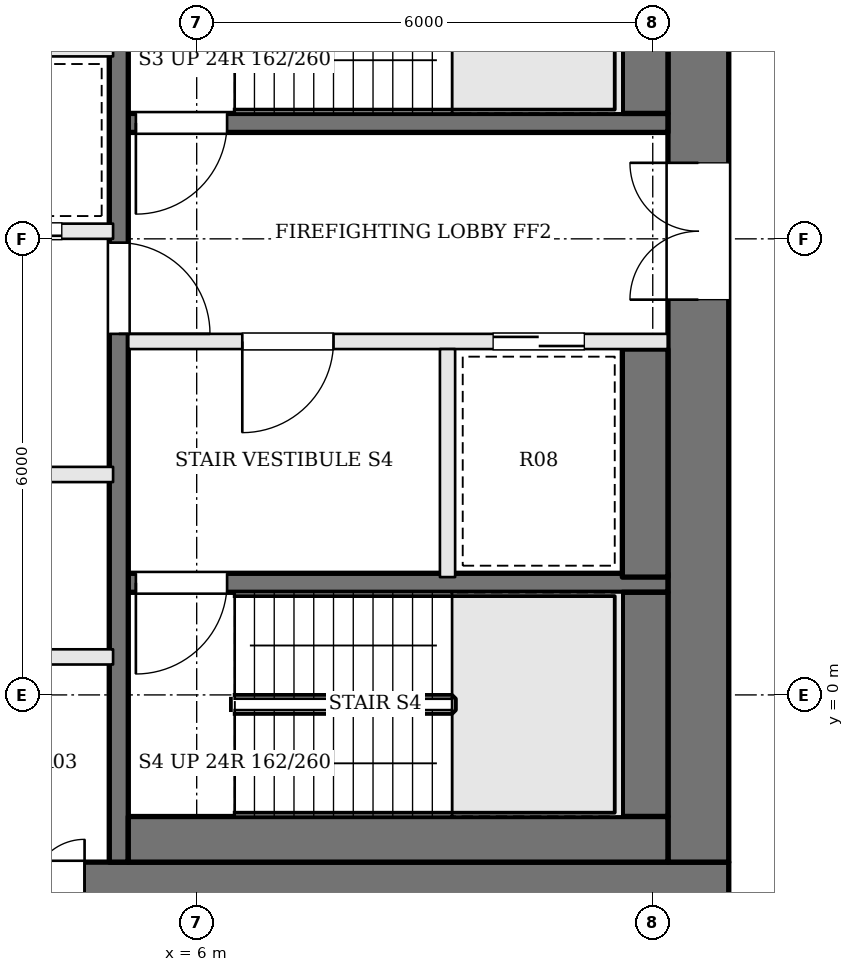
"""IFC4 building model, lengths in metres.
Left out: names, types, materials, properties, quantities, classifications, styles, units other than length and angle.
Written with IfcOpenShell. Run it as: python <this file> out.ifc"""

import sys

from ifc_helpers import new_model, si_unit, direction, frame, frame_2d, origin, place, context, subcontext, project, spatial, rectangle, extrude, element, fill, save


model = new_model("IFC4")
c1 = context("Model", 3, precision=1e-05, world=origin(), true_north=direction((0.0, 1.0)))
c2 = subcontext(c1, "Body", "Model", "MODEL_VIEW")
j1 = project(units=[si_unit("LENGTHUNIT", "METRE"), si_unit("PLANEANGLEUNIT", "RADIAN")], contexts=[c1])
p1 = place(None, origin())
s1 = spatial("IfcSite", under=j1, at=p1, CompositionType="ELEMENT")
p2 = place(p1, origin())
s2 = spatial("IfcBuilding", under=s1, at=p2, CompositionType="ELEMENT")
p3 = place(p2, frame((0.0, 0.0, 272.7)))
s3 = spatial("IfcBuildingStorey", under=s2, at=p3, CompositionType="ELEMENT", Elevation=272.7)
p4 = place(p3, frame((-13.0, -2.6, 0.0), z_axis=(0.0, 0.0, 1.0), x_axis=(1.0, 0.0, 0.0)))
e1 = element("IfcWall", 1, at=p4, inside=s3, PredefinedType="SHEAR", context=c2, shape_type="SweptSolid", body=[
    extrude(rectangle(XDim=26.0, YDim=0.8, at=frame_2d((13.0, 0.0))), origin(), (0.0, 0.0, 1.0), 3.9),
])
p5 = place(p4, frame((9.475, 0.0, 0.0)))
e2 = element("IfcOpeningElement", 2, at=p5, cuts=e1, PredefinedType="OPENING", context=c2, shape_type="SweptSolid", body=[
    extrude(rectangle(XDim=0.9, YDim=2.1, at=frame_2d((0.45, 1.05))), frame((0.0, 0.41, 0.0), z_axis=(0.0, -1.0, 0.0), x_axis=(1.0, 0.0, 0.0)), (0.0, 0.0, 1.0), 0.82),
])
p6 = place(p4, frame((12.75, 0.0, 0.0)))
e3 = element("IfcOpeningElement", 3, at=p6, cuts=e1, PredefinedType="OPENING", context=c2, shape_type="SweptSolid", body=[
    extrude(rectangle(XDim=0.9, YDim=2.1, at=frame_2d((0.45, 1.05))), frame((0.0, 0.41, 0.0), z_axis=(0.0, -1.0, 0.0), x_axis=(1.0, 0.0, 0.0)), (0.0, 0.0, 1.0), 0.82),
])
p7 = place(p4, frame((15.05, 0.0, 0.0)))
e4 = element("IfcOpeningElement", 4, at=p7, cuts=e1, PredefinedType="OPENING", context=c2, shape_type="SweptSolid", body=[
    extrude(rectangle(XDim=1.0, YDim=2.1, at=frame_2d((0.5, 1.05))), frame((0.0, 0.41, 0.0), z_axis=(0.0, -1.0, 0.0), x_axis=(1.0, 0.0, 0.0)), (0.0, 0.0, 1.0), 0.82),
])
p8 = place(p4, frame((16.825, 0.0, 0.0)))
e5 = element("IfcOpeningElement", 5, at=p8, cuts=e1, PredefinedType="OPENING", context=c2, shape_type="SweptSolid", body=[
    extrude(rectangle(XDim=0.7, YDim=2.1, at=frame_2d((0.35, 1.05))), frame((0.0, 0.41, 0.0), z_axis=(0.0, -1.0, 0.0), x_axis=(1.0, 0.0, 0.0)), (0.0, 0.0, 1.0), 0.82),
])
p9 = place(p3, frame((12.6, -2.2, 0.0), z_axis=(0.0, 0.0, 1.0), x_axis=(0.0, 1.0, 0.0)))
e6 = element("IfcWall", 6, at=p9, inside=s3, PredefinedType="SHEAR", context=c2, shape_type="SweptSolid", body=[
    extrude(rectangle(XDim=13.4, YDim=0.8, at=frame_2d((6.7, 0.0))), origin(), (0.0, 0.0, 1.0), 3.9),
])
p10 = place(p9, frame((7.4, 0.0, 0.0)))
e7 = element("IfcOpeningElement", 7, at=p10, cuts=e6, PredefinedType="OPENING", context=c2, shape_type="SweptSolid", body=[
    extrude(rectangle(XDim=1.8, YDim=2.1, at=frame_2d((0.9, 1.05))), frame((0.0, 0.41, 0.0), z_axis=(0.0, -1.0, 0.0), x_axis=(1.0, 0.0, 0.0)), (0.0, 0.0, 1.0), 0.82),
])
p11 = place(p3, frame((12.2, 7.525, 0.0), z_axis=(0.0, 0.0, 1.0), x_axis=(-1.0, 0.0, 0.0)))
e8 = element("IfcWall", 8, at=p11, inside=s3, PredefinedType="SOLIDWALL", context=c2, shape_type="SweptSolid", body=[
    extrude(rectangle(XDim=7.1, YDim=0.25, at=frame_2d((3.55, 0.0))), origin(), (0.0, 0.0, 1.0), 3.7),
])
p12 = place(p11, frame((5.8, 0.0, 0.0)))
e9 = element("IfcOpeningElement", 9, at=p12, cuts=e8, PredefinedType="OPENING", context=c2, shape_type="SweptSolid", body=[
    extrude(rectangle(XDim=1.2, YDim=2.1, at=frame_2d((0.6, 1.05))), frame((0.0, 0.135, 0.0), z_axis=(0.0, -1.0, 0.0), x_axis=(1.0, 0.0, 0.0)), (0.0, 0.0, 1.0), 0.27),
])
p13 = place(p3, frame((12.2, 4.65, 0.0), z_axis=(0.0, 0.0, 1.0), x_axis=(-1.0, 0.0, 0.0)))
e10 = element("IfcWall", 10, at=p13, inside=s3, PredefinedType="SOLIDWALL", context=c2, shape_type="SweptSolid", body=[
    extrude(rectangle(XDim=7.1, YDim=0.2, at=frame_2d((3.55, 0.0))), origin(), (0.0, 0.0, 1.0), 3.7),
])
p14 = place(p13, frame((4.4, 0.0, 0.0)))
e11 = element("IfcOpeningElement", 11, at=p14, cuts=e10, PredefinedType="OPENING", context=c2, shape_type="SweptSolid", body=[
    extrude(rectangle(XDim=1.2, YDim=2.1, at=frame_2d((0.6, 1.05))), frame((0.0, 0.11, 0.0), z_axis=(0.0, -1.0, 0.0), x_axis=(1.0, 0.0, 0.0)), (0.0, 0.0, 1.0), 0.22),
])
p15 = place(p13, frame((1.1, 0.0, 0.0)))
e12 = element("IfcOpeningElement", 12, at=p15, cuts=e10, PredefinedType="OPENING", context=c2, shape_type="SweptSolid", body=[
    extrude(rectangle(XDim=1.2, YDim=2.1, at=frame_2d((0.6, 1.05))), frame((0.0, 0.11, 0.0), z_axis=(0.0, -1.0, 0.0), x_axis=(1.0, 0.0, 0.0)), (0.0, 0.0, 1.0), 0.22),
])
p16 = place(p3, frame((12.2, 1.475, 0.0), z_axis=(0.0, 0.0, 1.0), x_axis=(-1.0, 0.0, 0.0)))
e13 = element("IfcWall", 13, at=p16, inside=s3, PredefinedType="SOLIDWALL", context=c2, shape_type="SweptSolid", body=[
    extrude(rectangle(XDim=7.1, YDim=0.25, at=frame_2d((3.55, 0.0))), origin(), (0.0, 0.0, 1.0), 3.7),
])
p17 = place(p16, frame((5.8, 0.0, 0.0)))
e14 = element("IfcOpeningElement", 14, at=p17, cuts=e13, PredefinedType="OPENING", context=c2, shape_type="SweptSolid", body=[
    extrude(rectangle(XDim=1.2, YDim=2.1, at=frame_2d((0.6, 1.05))), frame((0.0, 0.135, 0.0), z_axis=(0.0, -1.0, 0.0), x_axis=(1.0, 0.0, 0.0)), (0.0, 0.0, 1.0), 0.27),
])
p18 = place(p3, frame((9.3, 4.55, 0.0), z_axis=(0.0, 0.0, 1.0), x_axis=(0.0, -1.0, 0.0)))
e15 = element("IfcWall", 15, at=p18, inside=s3, PredefinedType="SOLIDWALL", context=c2, shape_type="SweptSolid", body=[
    extrude(rectangle(XDim=3.0, YDim=0.2, at=frame_2d((1.5, 0.0))), origin(), (0.0, 0.0, 1.0), 3.7),
])
p19 = place(p3, frame((4.975, 11.2, 0.0), z_axis=(0.0, 0.0, 1.0), x_axis=(0.0, -1.0, 0.0)))
e16 = element("IfcWall", 16, at=p19, inside=s3, PredefinedType="SOLIDWALL", context=c2, shape_type="SweptSolid", body=[
    extrude(rectangle(XDim=13.4, YDim=0.25, at=frame_2d((6.7, 0.0))), origin(), (0.0, 0.0, 1.0), 3.7),
])
p20 = place(p19, frame((5.25, 0.0, 0.0)))
e17 = element("IfcOpeningElement", 17, at=p20, cuts=e16, PredefinedType="OPENING", context=c2, shape_type="SweptSolid", body=[
    extrude(rectangle(XDim=1.2, YDim=2.1, at=frame_2d((0.6, 1.05))), frame((0.0, 0.135, 0.0), z_axis=(0.0, -1.0, 0.0), x_axis=(1.0, 0.0, 0.0)), (0.0, 0.0, 1.0), 0.27),
])
p21 = place(p3, frame((11.9, 10.6, 0.0), z_axis=(0.0, 0.0, 1.0), x_axis=(0.0, -1.0, 0.0)))
e18 = element("IfcWall", 18, at=p21, inside=s3, PredefinedType="SOLIDWALL", context=c2, shape_type="SweptSolid", body=[
    extrude(rectangle(XDim=2.95, YDim=0.6, at=frame_2d((1.475, 0.0))), origin(), (0.0, 0.0, 1.0), 3.7),
])
p22 = place(p3, frame((11.9, 4.55, 0.0), z_axis=(0.0, 0.0, 1.0), x_axis=(0.0, -1.0, 0.0)))
e19 = element("IfcWall", 19, at=p22, inside=s3, PredefinedType="SOLIDWALL", context=c2, shape_type="SweptSolid", body=[
    extrude(rectangle(XDim=3.0, YDim=0.6, at=frame_2d((1.5, 0.0))), origin(), (0.0, 0.0, 1.0), 3.7),
])
p23 = place(p3, frame((11.9, 1.35, 0.0), z_axis=(0.0, 0.0, 1.0), x_axis=(0.0, -1.0, 0.0)))
e20 = element("IfcWall", 20, at=p23, inside=s3, PredefinedType="SOLIDWALL", context=c2, shape_type="SweptSolid", body=[
    extrude(rectangle(XDim=2.95, YDim=0.6, at=frame_2d((1.475, 0.0))), origin(), (0.0, 0.0, 1.0), 3.7),
])
p24 = place(p3, frame((12.2, -1.9, 0.0), z_axis=(0.0, 0.0, 1.0), x_axis=(-1.0, 0.0, 0.0)))
e21 = element("IfcWall", 21, at=p24, inside=s3, PredefinedType="SOLIDWALL", context=c2, shape_type="SweptSolid", body=[
    extrude(rectangle(XDim=7.1, YDim=0.6, at=frame_2d((3.55, 0.0))), origin(), (0.0, 0.0, 1.0), 3.7),
])
p25 = place(p3, frame((-4.9, 0.5, 0.0), z_axis=(0.0, 0.0, 1.0), x_axis=(1.0, 0.0, 0.0)))
e22 = element("IfcWall", 22, at=p25, inside=s3, PredefinedType="SOLIDWALL", context=c2, shape_type="SweptSolid", body=[
    extrude(rectangle(XDim=9.8, YDim=0.2, at=frame_2d((4.9, 0.0))), origin(), (0.0, 0.0, 1.0), 3.7),
])
p26 = place(p3, frame((-4.9, 2.9, 0.0), z_axis=(0.0, 0.0, 1.0), x_axis=(1.0, 0.0, 0.0)))
e23 = element("IfcWall", 23, at=p26, inside=s3, PredefinedType="SOLIDWALL", context=c2, shape_type="SweptSolid", body=[
    extrude(rectangle(XDim=9.8, YDim=0.2, at=frame_2d((4.9, 0.0))), origin(), (0.0, 0.0, 1.0), 3.7),
])
p27 = place(p26, frame((0.675, 0.0, 0.0)))
e24 = element("IfcOpeningElement", 24, at=p27, cuts=e23, PredefinedType="OPENING", context=c2, shape_type="SweptSolid", body=[
    extrude(rectangle(XDim=1.1, YDim=2.1, at=frame_2d((0.55, 1.05))), frame((0.0, 0.11, 0.0), z_axis=(0.0, -1.0, 0.0), x_axis=(1.0, 0.0, 0.0)), (0.0, 0.0, 1.0), 0.22),
])
p28 = place(p26, frame((2.613, 0.0, 0.0)))
e25 = element("IfcOpeningElement", 25, at=p28, cuts=e23, PredefinedType="OPENING", context=c2, shape_type="SweptSolid", body=[
    extrude(rectangle(XDim=0.9, YDim=2.1, at=frame_2d((0.45, 1.05))), frame((0.0, 0.11, 0.0), z_axis=(0.0, -1.0, 0.0), x_axis=(1.0, 0.0, 0.0)), (0.0, 0.0, 1.0), 0.22),
])
p29 = place(p26, frame((4.35, 0.0, 0.0)))
e26 = element("IfcOpeningElement", 26, at=p29, cuts=e23, PredefinedType="OPENING", context=c2, shape_type="SweptSolid", body=[
    extrude(rectangle(XDim=1.1, YDim=2.1, at=frame_2d((0.55, 1.05))), frame((0.0, 0.11, 0.0), z_axis=(0.0, -1.0, 0.0), x_axis=(1.0, 0.0, 0.0)), (0.0, 0.0, 1.0), 0.22),
])
p30 = place(p26, frame((7.463, 0.0, 0.0)))
e27 = element("IfcOpeningElement", 27, at=p30, cuts=e23, PredefinedType="OPENING", context=c2, shape_type="SweptSolid", body=[
    extrude(rectangle(XDim=1.0, YDim=2.1, at=frame_2d((0.5, 1.05))), frame((0.0, 0.11, 0.0), z_axis=(0.0, -1.0, 0.0), x_axis=(1.0, 0.0, 0.0)), (0.0, 0.0, 1.0), 0.22),
])
p31 = place(p3, frame((-4.9, 6.1, 0.0), z_axis=(0.0, 0.0, 1.0), x_axis=(1.0, 0.0, 0.0)))
e28 = element("IfcWall", 28, at=p31, inside=s3, PredefinedType="SOLIDWALL", context=c2, shape_type="SweptSolid", body=[
    extrude(rectangle(XDim=9.8, YDim=0.2, at=frame_2d((4.9, 0.0))), origin(), (0.0, 0.0, 1.0), 3.7),
])
p32 = place(p31, frame((0.675, 0.0, 0.0)))
e29 = element("IfcOpeningElement", 29, at=p32, cuts=e28, PredefinedType="OPENING", context=c2, shape_type="SweptSolid", body=[
    extrude(rectangle(XDim=1.1, YDim=2.1, at=frame_2d((0.55, 1.05))), frame((0.0, 0.11, 0.0), z_axis=(0.0, -1.0, 0.0), x_axis=(1.0, 0.0, 0.0)), (0.0, 0.0, 1.0), 0.22),
])
p33 = place(p31, frame((3.125, 0.0, 0.0)))
e30 = element("IfcOpeningElement", 30, at=p33, cuts=e28, PredefinedType="OPENING", context=c2, shape_type="SweptSolid", body=[
    extrude(rectangle(XDim=1.1, YDim=2.1, at=frame_2d((0.55, 1.05))), frame((0.0, 0.11, 0.0), z_axis=(0.0, -1.0, 0.0), x_axis=(1.0, 0.0, 0.0)), (0.0, 0.0, 1.0), 0.22),
])
p34 = place(p31, frame((5.575, 0.0, 0.0)))
e31 = element("IfcOpeningElement", 31, at=p34, cuts=e28, PredefinedType="OPENING", context=c2, shape_type="SweptSolid", body=[
    extrude(rectangle(XDim=1.1, YDim=2.1, at=frame_2d((0.55, 1.05))), frame((0.0, 0.11, 0.0), z_axis=(0.0, -1.0, 0.0), x_axis=(1.0, 0.0, 0.0)), (0.0, 0.0, 1.0), 0.22),
])
p35 = place(p31, frame((8.025, 0.0, 0.0)))
e32 = element("IfcOpeningElement", 32, at=p35, cuts=e28, PredefinedType="OPENING", context=c2, shape_type="SweptSolid", body=[
    extrude(rectangle(XDim=1.1, YDim=2.1, at=frame_2d((0.55, 1.05))), frame((0.0, 0.11, 0.0), z_axis=(0.0, -1.0, 0.0), x_axis=(1.0, 0.0, 0.0)), (0.0, 0.0, 1.0), 0.22),
])
p36 = place(p3, frame((-4.9, 8.5, 0.0), z_axis=(0.0, 0.0, 1.0), x_axis=(1.0, 0.0, 0.0)))
e33 = element("IfcWall", 33, at=p36, inside=s3, PredefinedType="SOLIDWALL", context=c2, shape_type="SweptSolid", body=[
    extrude(rectangle(XDim=9.8, YDim=0.2, at=frame_2d((4.9, 0.0))), origin(), (0.0, 0.0, 1.0), 3.7),
])
p37 = place(p10, origin())
e34 = element("IfcDoor", 34, at=p37, inside=s3, OperationType="DOUBLE_DOOR_SINGLE_SWING", PredefinedType="DOOR", context=c2, shape_type="SweptSolid", body=[
    extrude(rectangle(XDim=1.8, YDim=2.1, at=frame_2d((0.9, 1.05))), frame((0.0, 0.025, 0.0), z_axis=(0.0, -1.0, 0.0), x_axis=(1.0, 0.0, 0.0)), (0.0, 0.0, 1.0), 0.05),
])
fill(e7, e34)
p38 = place(p20, origin())
e35 = element("IfcDoor", 35, at=p38, inside=s3, OperationType="SINGLE_SWING_RIGHT", PredefinedType="DOOR", context=c2, shape_type="SweptSolid", body=[
    extrude(rectangle(XDim=1.2, YDim=2.1, at=frame_2d((0.6, 1.05))), frame((0.0, 0.025, 0.0), z_axis=(0.0, -1.0, 0.0), x_axis=(1.0, 0.0, 0.0)), (0.0, 0.0, 1.0), 0.05),
])
fill(e17, e35)
p39 = place(p14, origin())
e36 = element("IfcDoor", 36, at=p39, inside=s3, OperationType="SINGLE_SWING_RIGHT", PredefinedType="DOOR", context=c2, shape_type="SweptSolid", body=[
    extrude(rectangle(XDim=1.2, YDim=2.1, at=frame_2d((0.6, 1.05))), frame((0.0, 0.025, 0.0), z_axis=(0.0, -1.0, 0.0), x_axis=(1.0, 0.0, 0.0)), (0.0, 0.0, 1.0), 0.05),
])
fill(e11, e36)
p40 = place(p12, origin())
e37 = element("IfcDoor", 37, at=p40, inside=s3, OperationType="SINGLE_SWING_RIGHT", PredefinedType="DOOR", context=c2, shape_type="SweptSolid", body=[
    extrude(rectangle(XDim=1.2, YDim=2.1, at=frame_2d((0.6, 1.05))), frame((0.0, 0.025, 0.0), z_axis=(0.0, -1.0, 0.0), x_axis=(1.0, 0.0, 0.0)), (0.0, 0.0, 1.0), 0.05),
])
fill(e9, e37)
p41 = place(p17, origin())
e38 = element("IfcDoor", 38, at=p41, inside=s3, OperationType="SINGLE_SWING_RIGHT", PredefinedType="DOOR", context=c2, shape_type="SweptSolid", body=[
    extrude(rectangle(XDim=1.2, YDim=2.1, at=frame_2d((0.6, 1.05))), frame((0.0, 0.025, 0.0), z_axis=(0.0, -1.0, 0.0), x_axis=(1.0, 0.0, 0.0)), (0.0, 0.0, 1.0), 0.05),
])
fill(e14, e38)
p42 = place(p15, origin())
e39 = element("IfcDoor", 39, at=p42, inside=s3, OperationType="SLIDING_TO_RIGHT", PredefinedType="DOOR", context=c2, shape_type="SweptSolid", body=[
    extrude(rectangle(XDim=1.2, YDim=2.1, at=frame_2d((0.6, 1.05))), frame((0.0, 0.025, 0.0), z_axis=(0.0, -1.0, 0.0), x_axis=(1.0, 0.0, 0.0)), (0.0, 0.0, 1.0), 0.05),
])
fill(e12, e39)
p43 = place(p35, origin())
e40 = element("IfcDoor", 40, at=p43, inside=s3, OperationType="SLIDING_TO_LEFT", PredefinedType="DOOR", context=c2, shape_type="SweptSolid", body=[
    extrude(rectangle(XDim=1.1, YDim=2.1, at=frame_2d((0.55, 1.05))), frame((0.0, 0.025, 0.0), z_axis=(0.0, -1.0, 0.0), x_axis=(1.0, 0.0, 0.0)), (0.0, 0.0, 1.0), 0.05),
])
fill(e32, e40)
p44 = place(p8, origin())
e41 = element("IfcDoor", 41, at=p44, inside=s3, OperationType="SINGLE_SWING_RIGHT", PredefinedType="DOOR", context=c2, shape_type="SweptSolid", body=[
    extrude(rectangle(XDim=0.7, YDim=2.1, at=frame_2d((0.35, 1.05))), frame((0.0, 0.025, 0.0), z_axis=(0.0, -1.0, 0.0), x_axis=(1.0, 0.0, 0.0)), (0.0, 0.0, 1.0), 0.05),
])
fill(e5, e41)
save(model, sys.argv[1])
